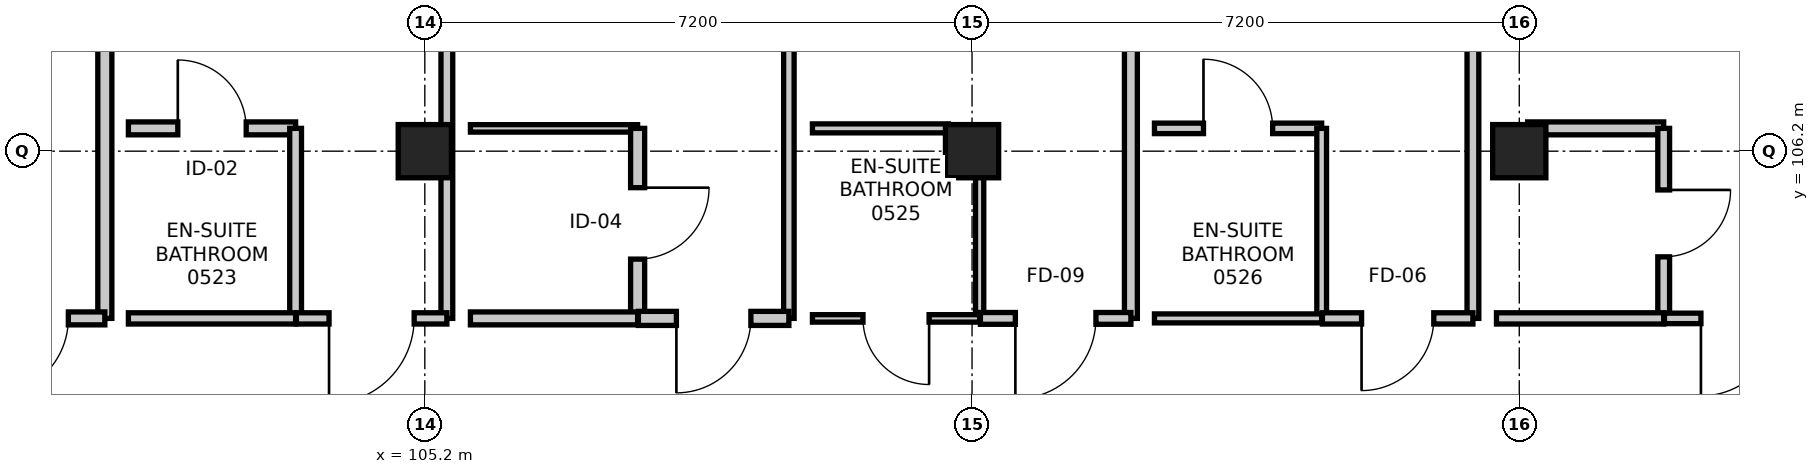
"""IFC4 building model, lengths in metres.
Left out: names, types, materials, properties, quantities, classifications, styles, units other than length and angle.
Written with IfcOpenShell. Run it as: python <this file> out.ifc"""

import sys

from ifc_helpers import new_model, si_unit, direction, frame, frame_2d, origin, origin_2d, place, context, subcontext, project, spatial, rectangle, extrude, element, fill, save


model = new_model("IFC4")
c1 = context("Model", 3, precision=1e-05, world=origin(), true_north=direction((0.0, 1.0)))
c2 = subcontext(c1, "Body", "Model", "MODEL_VIEW")
j1 = project(units=[si_unit("LENGTHUNIT", "METRE"), si_unit("PLANEANGLEUNIT", "RADIAN")], contexts=[c1])
p1 = place(None, origin())
s1 = spatial("IfcSite", under=j1, at=p1, CompositionType="ELEMENT")
p2 = place(p1, origin())
s2 = spatial("IfcBuilding", under=s1, at=p2, CompositionType="ELEMENT")
p3 = place(p2, frame((0.0, 0.0, 22.8)))
s3 = spatial("IfcBuildingStorey", under=s2, at=p3, CompositionType="ELEMENT", Elevation=22.8)
for number, where, z_axis, x_axis in (
    (1, (105.2, 106.2, 0.0), (0.0, 0.0, 1.0), (1.0, 0.0, 0.0)),
    (2, (112.4, 106.2, 0.0), (0.0, 0.0, 1.0), (1.0, 0.0, 0.0)),
    (3, (119.6, 106.2, 0.0), (0.0, 0.0, 1.0), (1.0, 0.0, 0.0)),
):
    element("IfcColumn", number, at=place(p3, frame(where, z_axis=z_axis, x_axis=x_axis)), inside=s3, PredefinedType="COLUMN", context=c2, shape_type="SweptSolid", body=[
        extrude(rectangle(XDim=0.7, YDim=0.7, at=origin_2d()), origin(), (0.0, 0.0, 1.0), 3.6),
    ])
p4 = place(p3, frame((100.99, 116.136, 0.0), z_axis=(0.0, 0.0, 1.0), x_axis=(0.0, -1.0, 0.0)))
e4 = element("IfcWall", 4, at=p4, inside=s3, PredefinedType="PARTITIONING", context=c2, shape_type="SweptSolid", body=[
    extrude(rectangle(XDim=12.136, YDim=0.185, at=frame_2d((6.068, 0.0))), origin(), (0.0, 0.0, 1.0), 2.735),
])
p5 = place(p3, frame((100.99, 104.0, 0.0), z_axis=(0.0, 0.0, 1.0), x_axis=(-1.0, 0.0, 0.0)))
e5 = element("IfcWall", 5, at=p5, inside=s3, PredefinedType="PARTITIONING", context=c2, shape_type="SweptSolid", body=[
    extrude(rectangle(XDim=1.98, YDim=0.17, at=frame_2d((0.99, 0.0))), origin(), (0.0, 0.0, 1.0), 3.35),
])
p6 = place(p5, frame((0.48, 0.0, 0.0)))
e6 = element("IfcOpeningElement", 6, at=p6, cuts=e5, PredefinedType="OPENING", context=c2, shape_type="SweptSolid", body=[
    extrude(rectangle(XDim=1.02, YDim=2.15, at=frame_2d((0.51, 1.075))), frame((0.0, 0.095, 0.0), z_axis=(0.0, -1.0, 0.0), x_axis=(1.0, 0.0, 0.0)), (0.0, 0.0, 1.0), 0.19),
])
p7 = place(p3, frame((101.3, 106.5, 0.0), z_axis=(0.0, 0.0, 1.0), x_axis=(1.0, 0.0, 0.0)))
e7 = element("IfcWall", 7, at=p7, inside=s3, PredefinedType="PARTITIONING", context=c2, shape_type="SweptSolid", body=[
    extrude(rectangle(XDim=2.2, YDim=0.17, at=frame_2d((1.1, 0.0))), origin(), (0.0, 0.0, 1.0), 2.735),
])
p8 = place(p7, frame((0.65, 0.0, 0.0)))
e8 = element("IfcOpeningElement", 8, at=p8, cuts=e7, PredefinedType="OPENING", context=c2, shape_type="SweptSolid", body=[
    extrude(rectangle(XDim=0.9, YDim=2.08, at=frame_2d((0.45, 1.04))), frame((0.0, 0.095, 0.0), z_axis=(0.0, -1.0, 0.0), x_axis=(1.0, 0.0, 0.0)), (0.0, 0.0, 1.0), 0.19),
])
p9 = place(p3, frame((103.5, 106.5, 0.0), z_axis=(0.0, 0.0, 1.0), x_axis=(0.0, -1.0, 0.0)))
e9 = element("IfcWall", 9, at=p9, inside=s3, PredefinedType="PARTITIONING", context=c2, shape_type="SweptSolid", body=[
    extrude(rectangle(XDim=2.5, YDim=0.155, at=frame_2d((1.25, 0.0))), origin(), (0.0, 0.0, 1.0), 2.735),
])
p10 = place(p3, frame((103.5, 104.0, 0.0), z_axis=(0.0, 0.0, 1.0), x_axis=(-1.0, 0.0, 0.0)))
e10 = element("IfcWall", 10, at=p10, inside=s3, PredefinedType="PARTITIONING", context=c2, shape_type="SweptSolid", body=[
    extrude(rectangle(XDim=2.2, YDim=0.148, at=frame_2d((1.1, 0.0))), origin(), (0.0, 0.0, 1.0), 3.35),
])
p11 = place(p3, frame((105.49, 115.713, 0.0), z_axis=(0.0, 0.0, 1.0), x_axis=(0.0, -1.0, 0.0)))
e11 = element("IfcWall", 11, at=p11, inside=s3, PredefinedType="PARTITIONING", context=c2, shape_type="SweptSolid", body=[
    extrude(rectangle(XDim=11.713, YDim=0.155, at=frame_2d((5.856, 0.0))), origin(), (0.0, 0.0, 1.0), 2.685),
])
p12 = place(p3, frame((105.49, 104.0, 0.0), z_axis=(0.0, 0.0, 1.0), x_axis=(-1.0, 0.0, 0.0)))
e12 = element("IfcWall", 12, at=p12, inside=s3, PredefinedType="PARTITIONING", context=c2, shape_type="SweptSolid", body=[
    extrude(rectangle(XDim=1.98, YDim=0.148, at=frame_2d((0.99, 0.0))), origin(), (0.0, 0.0, 1.0), 2.685),
])
p13 = place(p12, frame((0.43, 0.0, 0.0)))
e13 = element("IfcOpeningElement", 13, at=p13, cuts=e12, PredefinedType="OPENING", context=c2, shape_type="SweptSolid", body=[
    extrude(rectangle(XDim=1.12, YDim=2.2, at=frame_2d((0.56, 1.1))), frame((0.0, 0.084, 0.0), z_axis=(0.0, -1.0, 0.0), x_axis=(1.0, 0.0, 0.0)), (0.0, 0.0, 1.0), 0.168),
])
p14 = place(p3, frame((105.8, 106.5, 0.0), z_axis=(0.0, 0.0, 1.0), x_axis=(1.0, 0.0, 0.0)))
e14 = element("IfcWall", 14, at=p14, inside=s3, PredefinedType="PARTITIONING", context=c2, shape_type="SweptSolid", body=[
    extrude(rectangle(XDim=2.2, YDim=0.098, at=frame_2d((1.1, 0.0))), origin(), (0.0, 0.0, 1.0), 3.35),
])
p15 = place(p3, frame((108.0, 106.5, 0.0), z_axis=(0.0, 0.0, 1.0), x_axis=(0.0, -1.0, 0.0)))
e15 = element("IfcWall", 15, at=p15, inside=s3, PredefinedType="PARTITIONING", context=c2, shape_type="SweptSolid", body=[
    extrude(rectangle(XDim=2.5, YDim=0.185, at=frame_2d((1.25, 0.0))), origin(), (0.0, 0.0, 1.0), 2.735),
])
p16 = place(p15, frame((0.78, 0.0, 0.0)))
e16 = element("IfcOpeningElement", 16, at=p16, cuts=e15, PredefinedType="OPENING", context=c2, shape_type="SweptSolid", body=[
    extrude(rectangle(XDim=0.94, YDim=2.12, at=frame_2d((0.47, 1.06))), frame((0.0, 0.103, 0.0), z_axis=(0.0, -1.0, 0.0), x_axis=(1.0, 0.0, 0.0)), (0.0, 0.0, 1.0), 0.205),
])
p17 = place(p3, frame((108.0, 104.0, 0.0), z_axis=(0.0, 0.0, 1.0), x_axis=(-1.0, 0.0, 0.0)))
e17 = element("IfcWall", 17, at=p17, inside=s3, PredefinedType="PARTITIONING", context=c2, shape_type="SweptSolid", body=[
    extrude(rectangle(XDim=2.2, YDim=0.17, at=frame_2d((1.1, 0.0))), origin(), (0.0, 0.0, 1.0), 3.35),
])
p18 = place(p3, frame((109.99, 115.957, 0.0), z_axis=(0.0, 0.0, 1.0), x_axis=(0.0, -1.0, 0.0)))
e18 = element("IfcWall", 18, at=p18, inside=s3, PredefinedType="PARTITIONING", context=c2, shape_type="SweptSolid", body=[
    extrude(rectangle(XDim=11.957, YDim=0.138, at=frame_2d((5.979, 0.0))), origin(), (0.0, 0.0, 1.0), 2.735),
])
p19 = place(p3, frame((109.99, 104.0, 0.0), z_axis=(0.0, 0.0, 1.0), x_axis=(-1.0, 0.0, 0.0)))
e19 = element("IfcWall", 19, at=p19, inside=s3, PredefinedType="PARTITIONING", context=c2, shape_type="SweptSolid", body=[
    extrude(rectangle(XDim=1.98, YDim=0.185, at=frame_2d((0.99, 0.0))), origin(), (0.0, 0.0, 1.0), 3.35),
])
p20 = place(p19, frame((0.5, 0.0, 0.0)))
e20 = element("IfcOpeningElement", 20, at=p20, cuts=e19, PredefinedType="OPENING", context=c2, shape_type="SweptSolid", body=[
    extrude(rectangle(XDim=0.98, YDim=2.15, at=frame_2d((0.49, 1.075))), frame((0.0, 0.103, 0.0), z_axis=(0.0, -1.0, 0.0), x_axis=(1.0, 0.0, 0.0)), (0.0, 0.0, 1.0), 0.205),
])
p21 = place(p3, frame((110.3, 106.5, 0.0), z_axis=(0.0, 0.0, 1.0), x_axis=(1.0, 0.0, 0.0)))
e21 = element("IfcWall", 21, at=p21, inside=s3, PredefinedType="PARTITIONING", context=c2, shape_type="SweptSolid", body=[
    extrude(rectangle(XDim=1.79, YDim=0.118, at=frame_2d((0.895, 0.0))), origin(), (0.0, 0.0, 1.0), 3.35),
])
p22 = place(p3, frame((112.5, 106.09, 0.0), z_axis=(0.0, 0.0, 1.0), x_axis=(0.0, -1.0, 0.0)))
e22 = element("IfcWall", 22, at=p22, inside=s3, PredefinedType="PARTITIONING", context=c2, shape_type="SweptSolid", body=[
    extrude(rectangle(XDim=2.09, YDim=0.108, at=frame_2d((1.045, 0.0))), origin(), (0.0, 0.0, 1.0), 2.685),
])
p23 = place(p3, frame((112.5, 104.0, 0.0), z_axis=(0.0, 0.0, 1.0), x_axis=(-1.0, 0.0, 0.0)))
e23 = element("IfcWall", 23, at=p23, inside=s3, PredefinedType="PARTITIONING", context=c2, shape_type="SweptSolid", body=[
    extrude(rectangle(XDim=2.2, YDim=0.098, at=frame_2d((1.1, 0.0))), origin(), (0.0, 0.0, 1.0), 2.685),
])
p24 = place(p23, frame((0.665, 0.0, 0.0)))
e24 = element("IfcOpeningElement", 24, at=p24, cuts=e23, PredefinedType="OPENING", context=c2, shape_type="SweptSolid", body=[
    extrude(rectangle(XDim=0.87, YDim=2.07, at=frame_2d((0.435, 1.035))), frame((0.0, 0.059, 0.0), z_axis=(0.0, -1.0, 0.0), x_axis=(1.0, 0.0, 0.0)), (0.0, 0.0, 1.0), 0.118),
])
p25 = place(p3, frame((114.49, 115.79, 0.0), z_axis=(0.0, 0.0, 1.0), x_axis=(0.0, -1.0, 0.0)))
e25 = element("IfcWall", 25, at=p25, inside=s3, PredefinedType="PARTITIONING", context=c2, shape_type="SweptSolid", body=[
    extrude(rectangle(XDim=11.79, YDim=0.17, at=frame_2d((5.895, 0.0))), origin(), (0.0, 0.0, 1.0), 2.735),
])
p26 = place(p3, frame((114.49, 104.0, 0.0), z_axis=(0.0, 0.0, 1.0), x_axis=(-1.0, 0.0, 0.0)))
e26 = element("IfcWall", 26, at=p26, inside=s3, PredefinedType="PARTITIONING", context=c2, shape_type="SweptSolid", body=[
    extrude(rectangle(XDim=1.98, YDim=0.155, at=frame_2d((0.99, 0.0))), origin(), (0.0, 0.0, 1.0), 2.685),
])
p27 = place(p26, frame((0.46, 0.0, 0.0)))
e27 = element("IfcOpeningElement", 27, at=p27, cuts=e26, PredefinedType="OPENING", context=c2, shape_type="SweptSolid", body=[
    extrude(rectangle(XDim=1.06, YDim=2.2, at=frame_2d((0.53, 1.1))), frame((0.0, 0.087, 0.0), z_axis=(0.0, -1.0, 0.0), x_axis=(1.0, 0.0, 0.0)), (0.0, 0.0, 1.0), 0.175),
])
p28 = place(p3, frame((114.8, 106.5, 0.0), z_axis=(0.0, 0.0, 1.0), x_axis=(1.0, 0.0, 0.0)))
e28 = element("IfcWall", 28, at=p28, inside=s3, PredefinedType="PARTITIONING", context=c2, shape_type="SweptSolid", body=[
    extrude(rectangle(XDim=2.2, YDim=0.138, at=frame_2d((1.1, 0.0))), origin(), (0.0, 0.0, 1.0), 3.35),
])
p29 = place(p28, frame((0.645, 0.0, 0.0)))
e29 = element("IfcOpeningElement", 29, at=p29, cuts=e28, PredefinedType="OPENING", context=c2, shape_type="SweptSolid", body=[
    extrude(rectangle(XDim=0.91, YDim=2.11, at=frame_2d((0.455, 1.055))), frame((0.0, 0.079, 0.0), z_axis=(0.0, -1.0, 0.0), x_axis=(1.0, 0.0, 0.0)), (0.0, 0.0, 1.0), 0.158),
])
p30 = place(p3, frame((117.0, 106.5, 0.0), z_axis=(0.0, 0.0, 1.0), x_axis=(0.0, -1.0, 0.0)))
e30 = element("IfcWall", 30, at=p30, inside=s3, PredefinedType="PARTITIONING", context=c2, shape_type="SweptSolid", body=[
    extrude(rectangle(XDim=2.5, YDim=0.128, at=frame_2d((1.25, 0.0))), origin(), (0.0, 0.0, 1.0), 2.735),
])
p31 = place(p3, frame((117.0, 104.0, 0.0), z_axis=(0.0, 0.0, 1.0), x_axis=(-1.0, 0.0, 0.0)))
e31 = element("IfcWall", 31, at=p31, inside=s3, PredefinedType="PARTITIONING", context=c2, shape_type="SweptSolid", body=[
    extrude(rectangle(XDim=2.2, YDim=0.118, at=frame_2d((1.1, 0.0))), origin(), (0.0, 0.0, 1.0), 3.35),
])
p32 = place(p3, frame((118.99, 115.578, 0.0), z_axis=(0.0, 0.0, 1.0), x_axis=(0.0, -1.0, 0.0)))
e32 = element("IfcWall", 32, at=p32, inside=s3, PredefinedType="PARTITIONING", context=c2, shape_type="SweptSolid", body=[
    extrude(rectangle(XDim=11.578, YDim=0.155, at=frame_2d((5.789, 0.0))), origin(), (0.0, 0.0, 1.0), 2.735),
])
p33 = place(p3, frame((118.99, 104.0, 0.0), z_axis=(0.0, 0.0, 1.0), x_axis=(-1.0, 0.0, 0.0)))
e33 = element("IfcWall", 33, at=p33, inside=s3, PredefinedType="PARTITIONING", context=c2, shape_type="SweptSolid", body=[
    extrude(rectangle(XDim=1.98, YDim=0.148, at=frame_2d((0.99, 0.0))), origin(), (0.0, 0.0, 1.0), 3.35),
])
p34 = place(p33, frame((0.515, 0.0, 0.0)))
e34 = element("IfcOpeningElement", 34, at=p34, cuts=e33, PredefinedType="OPENING", context=c2, shape_type="SweptSolid", body=[
    extrude(rectangle(XDim=0.95, YDim=2.1, at=frame_2d((0.475, 1.05))), frame((0.0, 0.084, 0.0), z_axis=(0.0, -1.0, 0.0), x_axis=(1.0, 0.0, 0.0)), (0.0, 0.0, 1.0), 0.168),
])
p35 = place(p3, frame((119.71, 106.5, 0.0), z_axis=(0.0, 0.0, 1.0), x_axis=(1.0, 0.0, 0.0)))
e35 = element("IfcWall", 35, at=p35, inside=s3, PredefinedType="PARTITIONING", context=c2, shape_type="SweptSolid", body=[
    extrude(rectangle(XDim=1.79, YDim=0.17, at=frame_2d((0.895, 0.0))), origin(), (0.0, 0.0, 1.0), 2.685),
])
p36 = place(p3, frame((121.5, 106.5, 0.0), z_axis=(0.0, 0.0, 1.0), x_axis=(0.0, -1.0, 0.0)))
e36 = element("IfcWall", 36, at=p36, inside=s3, PredefinedType="PARTITIONING", context=c2, shape_type="SweptSolid", body=[
    extrude(rectangle(XDim=2.5, YDim=0.155, at=frame_2d((1.25, 0.0))), origin(), (0.0, 0.0, 1.0), 2.735),
])
p37 = place(p36, frame((0.81, 0.0, 0.0)))
e37 = element("IfcOpeningElement", 37, at=p37, cuts=e36, PredefinedType="OPENING", context=c2, shape_type="SweptSolid", body=[
    extrude(rectangle(XDim=0.88, YDim=2.06, at=frame_2d((0.44, 1.03))), frame((0.0, 0.087, 0.0), z_axis=(0.0, -1.0, 0.0), x_axis=(1.0, 0.0, 0.0)), (0.0, 0.0, 1.0), 0.175),
])
p38 = place(p3, frame((121.5, 104.0, 0.0), z_axis=(0.0, 0.0, 1.0), x_axis=(-1.0, 0.0, 0.0)))
e38 = element("IfcWall", 38, at=p38, inside=s3, PredefinedType="PARTITIONING", context=c2, shape_type="SweptSolid", body=[
    extrude(rectangle(XDim=2.2, YDim=0.148, at=frame_2d((1.1, 0.0))), origin(), (0.0, 0.0, 1.0), 2.685),
])
p39 = place(p3, frame((123.49, 104.0, 0.0), z_axis=(0.0, 0.0, 1.0), x_axis=(-1.0, 0.0, 0.0)))
e39 = element("IfcWall", 39, at=p39, inside=s3, PredefinedType="PARTITIONING", context=c2, shape_type="SweptSolid", body=[
    extrude(rectangle(XDim=1.98, YDim=0.138, at=frame_2d((0.99, 0.0))), origin(), (0.0, 0.0, 1.0), 3.35),
])
p40 = place(p39, frame((0.48, 0.0, 0.0)))
e40 = element("IfcOpeningElement", 40, at=p40, cuts=e39, PredefinedType="OPENING", context=c2, shape_type="SweptSolid", body=[
    extrude(rectangle(XDim=1.02, YDim=2.15, at=frame_2d((0.51, 1.075))), frame((0.0, 0.079, 0.0), z_axis=(0.0, -1.0, 0.0), x_axis=(1.0, 0.0, 0.0)), (0.0, 0.0, 1.0), 0.158),
])
p41 = place(p6, origin())
e41 = element("IfcDoor", 41, at=p41, inside=s3, OperationType="SINGLE_SWING_RIGHT", PredefinedType="DOOR", context=c2, shape_type="SweptSolid", body=[
    extrude(rectangle(XDim=1.02, YDim=2.15, at=frame_2d((0.51, 1.075))), frame((0.0, 0.025, 0.0), z_axis=(0.0, -1.0, 0.0), x_axis=(1.0, 0.0, 0.0)), (0.0, 0.0, 1.0), 0.05),
])
fill(e6, e41)
p42 = place(p8, origin())
e42 = element("IfcDoor", 42, at=p42, inside=s3, OperationType="SINGLE_SWING_LEFT", PredefinedType="DOOR", context=c2, shape_type="SweptSolid", body=[
    extrude(rectangle(XDim=0.9, YDim=2.08, at=frame_2d((0.45, 1.04))), frame((0.0, 0.025, 0.0), z_axis=(0.0, -1.0, 0.0), x_axis=(1.0, 0.0, 0.0)), (0.0, 0.0, 1.0), 0.05),
])
fill(e8, e42)
p43 = place(p13, origin())
e43 = element("IfcDoor", 43, at=p43, inside=s3, OperationType="SINGLE_SWING_RIGHT", PredefinedType="DOOR", context=c2, shape_type="SweptSolid", body=[
    extrude(rectangle(XDim=1.12, YDim=2.2, at=frame_2d((0.56, 1.1))), frame((0.0, 0.025, 0.0), z_axis=(0.0, -1.0, 0.0), x_axis=(1.0, 0.0, 0.0)), (0.0, 0.0, 1.0), 0.05),
])
fill(e13, e43)
p44 = place(p16, origin())
e44 = element("IfcDoor", 44, at=p44, inside=s3, OperationType="SINGLE_SWING_LEFT", PredefinedType="DOOR", context=c2, shape_type="SweptSolid", body=[
    extrude(rectangle(XDim=0.94, YDim=2.12, at=frame_2d((0.47, 1.06))), frame((0.0, 0.025, 0.0), z_axis=(0.0, -1.0, 0.0), x_axis=(1.0, 0.0, 0.0)), (0.0, 0.0, 1.0), 0.05),
])
fill(e16, e44)
p45 = place(p20, origin())
e45 = element("IfcDoor", 45, at=p45, inside=s3, OperationType="SINGLE_SWING_RIGHT", PredefinedType="DOOR", context=c2, shape_type="SweptSolid", body=[
    extrude(rectangle(XDim=0.98, YDim=2.15, at=frame_2d((0.49, 1.075))), frame((0.0, 0.025, 0.0), z_axis=(0.0, -1.0, 0.0), x_axis=(1.0, 0.0, 0.0)), (0.0, 0.0, 1.0), 0.05),
])
fill(e20, e45)
p46 = place(p24, origin())
e46 = element("IfcDoor", 46, at=p46, inside=s3, OperationType="SINGLE_SWING_LEFT", PredefinedType="DOOR", context=c2, shape_type="SweptSolid", body=[
    extrude(rectangle(XDim=0.87, YDim=2.07, at=frame_2d((0.435, 1.035))), frame((0.0, 0.025, 0.0), z_axis=(0.0, -1.0, 0.0), x_axis=(1.0, 0.0, 0.0)), (0.0, 0.0, 1.0), 0.05),
])
fill(e24, e46)
p47 = place(p27, origin())
e47 = element("IfcDoor", 47, at=p47, inside=s3, OperationType="SINGLE_SWING_RIGHT", PredefinedType="DOOR", context=c2, shape_type="SweptSolid", body=[
    extrude(rectangle(XDim=1.06, YDim=2.2, at=frame_2d((0.53, 1.1))), frame((0.0, 0.025, 0.0), z_axis=(0.0, -1.0, 0.0), x_axis=(1.0, 0.0, 0.0)), (0.0, 0.0, 1.0), 0.05),
])
fill(e27, e47)
p48 = place(p29, origin())
e48 = element("IfcDoor", 48, at=p48, inside=s3, OperationType="SINGLE_SWING_LEFT", PredefinedType="DOOR", context=c2, shape_type="SweptSolid", body=[
    extrude(rectangle(XDim=0.91, YDim=2.11, at=frame_2d((0.455, 1.055))), frame((0.0, 0.025, 0.0), z_axis=(0.0, -1.0, 0.0), x_axis=(1.0, 0.0, 0.0)), (0.0, 0.0, 1.0), 0.05),
])
fill(e29, e48)
p49 = place(p34, origin())
e49 = element("IfcDoor", 49, at=p49, inside=s3, OperationType="SINGLE_SWING_RIGHT", PredefinedType="DOOR", context=c2, shape_type="SweptSolid", body=[
    extrude(rectangle(XDim=0.95, YDim=2.1, at=frame_2d((0.475, 1.05))), frame((0.0, 0.025, 0.0), z_axis=(0.0, -1.0, 0.0), x_axis=(1.0, 0.0, 0.0)), (0.0, 0.0, 1.0), 0.05),
])
fill(e34, e49)
p50 = place(p37, origin())
e50 = element("IfcDoor", 50, at=p50, inside=s3, OperationType="SINGLE_SWING_LEFT", PredefinedType="DOOR", context=c2, shape_type="SweptSolid", body=[
    extrude(rectangle(XDim=0.88, YDim=2.06, at=frame_2d((0.44, 1.03))), frame((0.0, 0.025, 0.0), z_axis=(0.0, -1.0, 0.0), x_axis=(1.0, 0.0, 0.0)), (0.0, 0.0, 1.0), 0.05),
])
fill(e37, e50)
p51 = place(p40, origin())
e51 = element("IfcDoor", 51, at=p51, inside=s3, OperationType="SINGLE_SWING_RIGHT", PredefinedType="DOOR", context=c2, shape_type="SweptSolid", body=[
    extrude(rectangle(XDim=1.02, YDim=2.15, at=frame_2d((0.51, 1.075))), frame((0.0, 0.025, 0.0), z_axis=(0.0, -1.0, 0.0), x_axis=(1.0, 0.0, 0.0)), (0.0, 0.0, 1.0), 0.05),
])
fill(e40, e51)
save(model, sys.argv[1])
